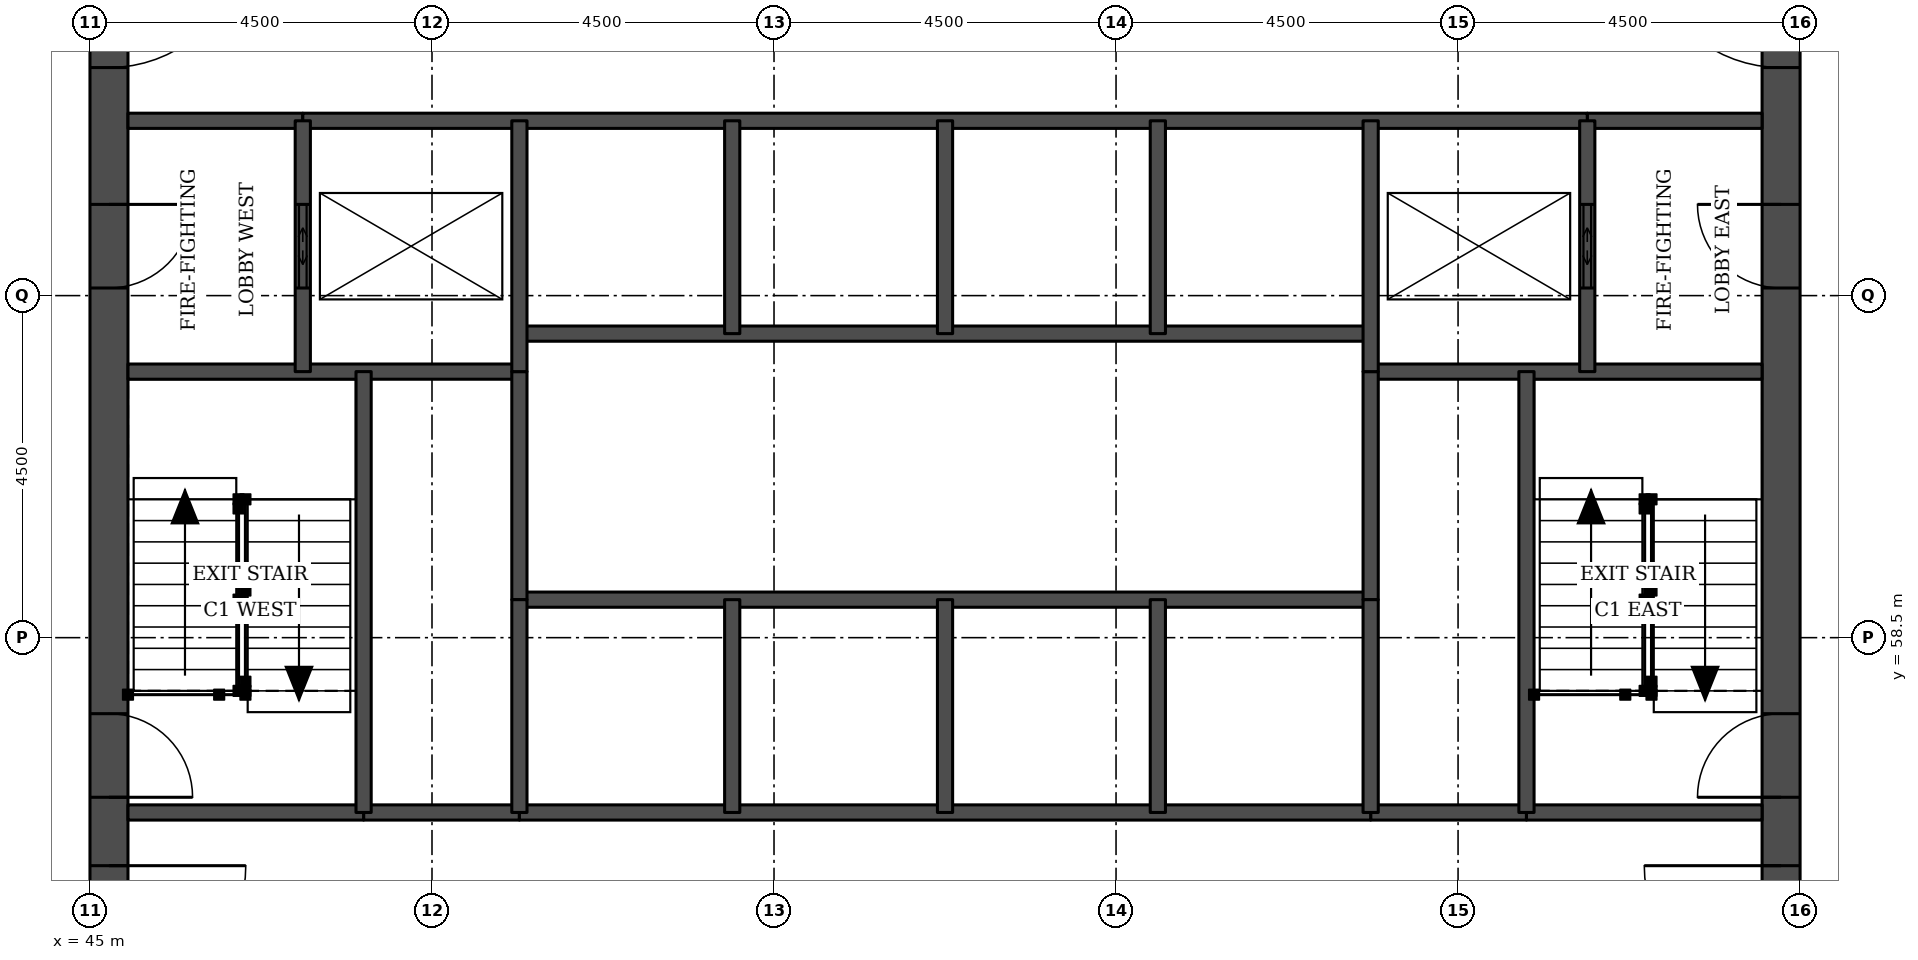
"""IFC4 building model, lengths in metres.
Left out: names, types, materials, properties, quantities, classifications, styles, units other than length and angle.
Written with IfcOpenShell. Run it as: python <this file> out.ifc"""

import sys

from ifc_helpers import new_model, si_unit, direction, frame, frame_2d, origin, place, context, subcontext, project, spatial, rectangle, extrude, element, fill, save


model = new_model("IFC4")
c1 = context("Model", 3, precision=1e-05, world=origin(), true_north=direction((0.0, 1.0)))
c2 = subcontext(c1, "Body", "Model", "MODEL_VIEW")
j1 = project(units=[si_unit("LENGTHUNIT", "METRE"), si_unit("PLANEANGLEUNIT", "RADIAN")], contexts=[c1])
p1 = place(None, origin())
s1 = spatial("IfcSite", under=j1, at=p1, CompositionType="ELEMENT")
p2 = place(p1, origin())
s2 = spatial("IfcBuilding", under=s1, at=p2, CompositionType="ELEMENT")
p3 = place(p2, frame((0.0, 0.0, 46.2)))
s3 = spatial("IfcBuildingStorey", under=s2, at=p3, CompositionType="ELEMENT", Elevation=46.2)
p4 = place(p3, frame((45.25, 49.5, 0.0), z_axis=(0.0, 0.0, 1.0), x_axis=(0.0, 1.0, 0.0)))
e1 = element("IfcWall", 1, at=p4, inside=s3, PredefinedType="SHEAR", context=c2, shape_type="SweptSolid", body=[
    extrude(rectangle(XDim=22.5, YDim=0.5, at=frame_2d((11.25, 0.0))), origin(), (0.0, 0.0, 1.0), 3.3),
])
p5 = place(p4, frame((4.2, 0.0, 0.0)))
e2 = element("IfcOpeningElement", 2, at=p5, cuts=e1, PredefinedType="OPENING", context=c2, shape_type="SweptSolid", body=[
    extrude(rectangle(XDim=1.8, YDim=2.1, at=frame_2d((0.9, 1.05))), frame((0.0, 0.26, 0.0), z_axis=(0.0, -1.0, 0.0), x_axis=(1.0, 0.0, 0.0)), (0.0, 0.0, 1.0), 0.52),
])
p6 = place(p4, frame((6.9, 0.0, 0.0)))
e3 = element("IfcOpeningElement", 3, at=p6, cuts=e1, PredefinedType="OPENING", context=c2, shape_type="SweptSolid", body=[
    extrude(rectangle(XDim=1.1, YDim=2.1, at=frame_2d((0.55, 1.05))), frame((0.0, 0.26, 0.0), z_axis=(0.0, -1.0, 0.0), x_axis=(1.0, 0.0, 0.0)), (0.0, 0.0, 1.0), 0.52),
])
p7 = place(p4, frame((13.6, 0.0, 0.0)))
e4 = element("IfcOpeningElement", 4, at=p7, cuts=e1, PredefinedType="OPENING", context=c2, shape_type="SweptSolid", body=[
    extrude(rectangle(XDim=1.1, YDim=2.1, at=frame_2d((0.55, 1.05))), frame((0.0, 0.26, 0.0), z_axis=(0.0, -1.0, 0.0), x_axis=(1.0, 0.0, 0.0)), (0.0, 0.0, 1.0), 0.52),
])
p8 = place(p4, frame((16.5, 0.0, 0.0)))
e5 = element("IfcOpeningElement", 5, at=p8, cuts=e1, PredefinedType="OPENING", context=c2, shape_type="SweptSolid", body=[
    extrude(rectangle(XDim=1.8, YDim=2.1, at=frame_2d((0.9, 1.05))), frame((0.0, 0.26, 0.0), z_axis=(0.0, -1.0, 0.0), x_axis=(1.0, 0.0, 0.0)), (0.0, 0.0, 1.0), 0.52),
])
p9 = place(p3, frame((67.25, 49.5, 0.0), z_axis=(0.0, 0.0, 1.0), x_axis=(0.0, 1.0, 0.0)))
e6 = element("IfcWall", 6, at=p9, inside=s3, PredefinedType="SHEAR", context=c2, shape_type="SweptSolid", body=[
    extrude(rectangle(XDim=22.5, YDim=0.5, at=frame_2d((11.25, 0.0))), origin(), (0.0, 0.0, 1.0), 3.3),
])
p10 = place(p9, frame((4.2, 0.0, 0.0)))
e7 = element("IfcOpeningElement", 7, at=p10, cuts=e6, PredefinedType="OPENING", context=c2, shape_type="SweptSolid", body=[
    extrude(rectangle(XDim=1.8, YDim=2.1, at=frame_2d((0.9, 1.05))), frame((0.0, 0.26, 0.0), z_axis=(0.0, -1.0, 0.0), x_axis=(1.0, 0.0, 0.0)), (0.0, 0.0, 1.0), 0.52),
])
p11 = place(p9, frame((6.9, 0.0, 0.0)))
e8 = element("IfcOpeningElement", 8, at=p11, cuts=e6, PredefinedType="OPENING", context=c2, shape_type="SweptSolid", body=[
    extrude(rectangle(XDim=1.1, YDim=2.1, at=frame_2d((0.55, 1.05))), frame((0.0, 0.26, 0.0), z_axis=(0.0, -1.0, 0.0), x_axis=(1.0, 0.0, 0.0)), (0.0, 0.0, 1.0), 0.52),
])
p12 = place(p9, frame((13.6, 0.0, 0.0)))
e9 = element("IfcOpeningElement", 9, at=p12, cuts=e6, PredefinedType="OPENING", context=c2, shape_type="SweptSolid", body=[
    extrude(rectangle(XDim=1.1, YDim=2.1, at=frame_2d((0.55, 1.05))), frame((0.0, 0.26, 0.0), z_axis=(0.0, -1.0, 0.0), x_axis=(1.0, 0.0, 0.0)), (0.0, 0.0, 1.0), 0.52),
])
p13 = place(p9, frame((16.5, 0.0, 0.0)))
e10 = element("IfcOpeningElement", 10, at=p13, cuts=e6, PredefinedType="OPENING", context=c2, shape_type="SweptSolid", body=[
    extrude(rectangle(XDim=1.8, YDim=2.1, at=frame_2d((0.9, 1.05))), frame((0.0, 0.26, 0.0), z_axis=(0.0, -1.0, 0.0), x_axis=(1.0, 0.0, 0.0)), (0.0, 0.0, 1.0), 0.52),
])
for number, where, z_axis, x_axis in (
    (11, (48.6, 56.2, 0.0), (0.0, 0.0, 1.0), (1.0, 0.0, 0.0)),
    (12, (61.85, 56.2, 0.0), (0.0, 0.0, 1.0), (1.0, 0.0, 0.0)),
):
    element("IfcWall", number, at=place(p3, frame(where, z_axis=z_axis, x_axis=x_axis)), inside=s3, PredefinedType="SOLIDWALL", context=c2, shape_type="SweptSolid", body=[
        extrude(rectangle(XDim=2.05, YDim=0.2, at=frame_2d((1.025, 0.0))), origin(), (0.0, 0.0, 1.0), 3.08),
    ])
p14 = place(p3, frame((45.5, 56.2, 0.0), z_axis=(0.0, 0.0, 1.0), x_axis=(1.0, 0.0, 0.0)))
e13 = element("IfcWall", 13, at=p14, inside=s3, PredefinedType="SOLIDWALL", context=c2, shape_type="SweptSolid", body=[
    extrude(rectangle(XDim=3.1, YDim=0.2, at=frame_2d((1.55, 0.0))), origin(), (0.0, 0.0, 1.0), 3.08),
])
p15 = place(p3, frame((50.65, 56.2, 0.0), z_axis=(0.0, 0.0, 1.0), x_axis=(1.0, 0.0, 0.0)))
e14 = element("IfcWall", 14, at=p15, inside=s3, PredefinedType="SOLIDWALL", context=c2, shape_type="SweptSolid", body=[
    extrude(rectangle(XDim=11.2, YDim=0.2, at=frame_2d((5.6, 0.0))), origin(), (0.0, 0.0, 1.0), 3.08),
])
p16 = place(p3, frame((63.9, 56.2, 0.0), z_axis=(0.0, 0.0, 1.0), x_axis=(1.0, 0.0, 0.0)))
e15 = element("IfcWall", 15, at=p16, inside=s3, PredefinedType="SOLIDWALL", context=c2, shape_type="SweptSolid", body=[
    extrude(rectangle(XDim=3.1, YDim=0.2, at=frame_2d((1.55, 0.0))), origin(), (0.0, 0.0, 1.0), 3.08),
])
p17 = place(p3, frame((50.65, 59.0, 0.0), z_axis=(0.0, 0.0, 1.0), x_axis=(1.0, 0.0, 0.0)))
e16 = element("IfcWall", 16, at=p17, inside=s3, PredefinedType="SOLIDWALL", context=c2, shape_type="SweptSolid", body=[
    extrude(rectangle(XDim=11.2, YDim=0.2, at=frame_2d((5.6, 0.0))), origin(), (0.0, 0.0, 1.0), 3.3),
])
for number, where, z_axis, x_axis in (
    (17, (45.5, 62.0, 0.0), (0.0, 0.0, 1.0), (1.0, 0.0, 0.0)),
    (18, (61.85, 62.0, 0.0), (0.0, 0.0, 1.0), (1.0, 0.0, 0.0)),
):
    element("IfcWall", number, at=place(p3, frame(where, z_axis=z_axis, x_axis=x_axis)), inside=s3, PredefinedType="SOLIDWALL", context=c2, shape_type="SweptSolid", body=[
        extrude(rectangle(XDim=5.15, YDim=0.2, at=frame_2d((2.575, 0.0))), origin(), (0.0, 0.0, 1.0), 3.08),
    ])
p18 = place(p3, frame((50.65, 62.5, 0.0), z_axis=(0.0, 0.0, 1.0), x_axis=(1.0, 0.0, 0.0)))
e19 = element("IfcWall", 19, at=p18, inside=s3, PredefinedType="SOLIDWALL", context=c2, shape_type="SweptSolid", body=[
    extrude(rectangle(XDim=11.2, YDim=0.2, at=frame_2d((5.6, 0.0))), origin(), (0.0, 0.0, 1.0), 3.3),
])
for number, where, z_axis, x_axis in (
    (20, (45.5, 65.3, 0.0), (0.0, 0.0, 1.0), (1.0, 0.0, 0.0)),
    (21, (64.7, 65.3, 0.0), (0.0, 0.0, 1.0), (1.0, 0.0, 0.0)),
):
    element("IfcWall", number, at=place(p3, frame(where, z_axis=z_axis, x_axis=x_axis)), inside=s3, PredefinedType="SOLIDWALL", context=c2, shape_type="SweptSolid", body=[
        extrude(rectangle(XDim=2.3, YDim=0.2, at=frame_2d((1.15, 0.0))), origin(), (0.0, 0.0, 1.0), 3.08),
    ])
p19 = place(p3, frame((47.8, 65.3, 0.0), z_axis=(0.0, 0.0, 1.0), x_axis=(1.0, 0.0, 0.0)))
e22 = element("IfcWall", 22, at=p19, inside=s3, PredefinedType="SOLIDWALL", context=c2, shape_type="SweptSolid", body=[
    extrude(rectangle(XDim=16.9, YDim=0.2, at=frame_2d((8.45, 0.0))), origin(), (0.0, 0.0, 1.0), 3.08),
])
p20 = place(p3, frame((47.8, 62.0, 0.0), z_axis=(0.0, 0.0, 1.0), x_axis=(0.0, 1.0, 0.0)))
e23 = element("IfcWall", 23, at=p20, inside=s3, PredefinedType="SOLIDWALL", context=c2, shape_type="SweptSolid", body=[
    extrude(rectangle(XDim=3.3, YDim=0.2, at=frame_2d((1.65, 0.0))), origin(), (0.0, 0.0, 1.0), 3.08),
])
p21 = place(p20, frame((1.1, 0.0, 0.0)))
e24 = element("IfcOpeningElement", 24, at=p21, cuts=e23, PredefinedType="OPENING", context=c2, shape_type="SweptSolid", body=[
    extrude(rectangle(XDim=1.1, YDim=2.1, at=frame_2d((0.55, 1.05))), frame((0.0, 0.11, 0.0), z_axis=(0.0, -1.0, 0.0), x_axis=(1.0, 0.0, 0.0)), (0.0, 0.0, 1.0), 0.22),
])
p22 = place(p3, frame((48.6, 56.2, 0.0), z_axis=(0.0, 0.0, 1.0), x_axis=(0.0, 1.0, 0.0)))
e25 = element("IfcWall", 25, at=p22, inside=s3, PredefinedType="SOLIDWALL", context=c2, shape_type="SweptSolid", body=[
    extrude(rectangle(XDim=5.8, YDim=0.2, at=frame_2d((2.9, 0.0))), origin(), (0.0, 0.0, 1.0), 3.08),
])
p23 = place(p3, frame((50.65, 59.0, 0.0), z_axis=(0.0, 0.0, 1.0), x_axis=(0.0, 1.0, 0.0)))
e26 = element("IfcWall", 26, at=p23, inside=s3, PredefinedType="SOLIDWALL", context=c2, shape_type="SweptSolid", body=[
    extrude(rectangle(XDim=3.0, YDim=0.2, at=frame_2d((1.5, 0.0))), origin(), (0.0, 0.0, 1.0), 3.3),
])
p24 = place(p3, frame((50.65, 56.2, 0.0), z_axis=(0.0, 0.0, 1.0), x_axis=(0.0, 1.0, 0.0)))
e27 = element("IfcWall", 27, at=p24, inside=s3, PredefinedType="SOLIDWALL", context=c2, shape_type="SweptSolid", body=[
    extrude(rectangle(XDim=2.8, YDim=0.2, at=frame_2d((1.4, 0.0))), origin(), (0.0, 0.0, 1.0), 3.08),
])
p25 = place(p3, frame((50.65, 62.0, 0.0), z_axis=(0.0, 0.0, 1.0), x_axis=(0.0, 1.0, 0.0)))
e28 = element("IfcWall", 28, at=p25, inside=s3, PredefinedType="SOLIDWALL", context=c2, shape_type="SweptSolid", body=[
    extrude(rectangle(XDim=3.3, YDim=0.2, at=frame_2d((1.65, 0.0))), origin(), (0.0, 0.0, 1.0), 3.08),
])
for number, where, z_axis, x_axis in (
    (29, (53.45, 56.2, 0.0), (0.0, 0.0, 1.0), (0.0, 1.0, 0.0)),
    (30, (53.45, 62.5, 0.0), (0.0, 0.0, 1.0), (0.0, 1.0, 0.0)),
    (31, (56.25, 56.2, 0.0), (0.0, 0.0, 1.0), (0.0, 1.0, 0.0)),
    (32, (56.25, 62.5, 0.0), (0.0, 0.0, 1.0), (0.0, 1.0, 0.0)),
    (33, (59.05, 56.2, 0.0), (0.0, 0.0, 1.0), (0.0, 1.0, 0.0)),
    (34, (59.05, 62.5, 0.0), (0.0, 0.0, 1.0), (0.0, 1.0, 0.0)),
):
    element("IfcWall", number, at=place(p3, frame(where, z_axis=z_axis, x_axis=x_axis)), inside=s3, PredefinedType="SOLIDWALL", context=c2, shape_type="SweptSolid", body=[
        extrude(rectangle(XDim=2.8, YDim=0.2, at=frame_2d((1.4, 0.0))), origin(), (0.0, 0.0, 1.0), 3.08),
    ])
p26 = place(p3, frame((61.85, 59.0, 0.0), z_axis=(0.0, 0.0, 1.0), x_axis=(0.0, 1.0, 0.0)))
e35 = element("IfcWall", 35, at=p26, inside=s3, PredefinedType="SOLIDWALL", context=c2, shape_type="SweptSolid", body=[
    extrude(rectangle(XDim=3.0, YDim=0.2, at=frame_2d((1.5, 0.0))), origin(), (0.0, 0.0, 1.0), 3.3),
])
p27 = place(p3, frame((61.85, 56.2, 0.0), z_axis=(0.0, 0.0, 1.0), x_axis=(0.0, 1.0, 0.0)))
e36 = element("IfcWall", 36, at=p27, inside=s3, PredefinedType="SOLIDWALL", context=c2, shape_type="SweptSolid", body=[
    extrude(rectangle(XDim=2.8, YDim=0.2, at=frame_2d((1.4, 0.0))), origin(), (0.0, 0.0, 1.0), 3.08),
])
p28 = place(p3, frame((61.85, 62.0, 0.0), z_axis=(0.0, 0.0, 1.0), x_axis=(0.0, 1.0, 0.0)))
e37 = element("IfcWall", 37, at=p28, inside=s3, PredefinedType="SOLIDWALL", context=c2, shape_type="SweptSolid", body=[
    extrude(rectangle(XDim=3.3, YDim=0.2, at=frame_2d((1.65, 0.0))), origin(), (0.0, 0.0, 1.0), 3.08),
])
p29 = place(p3, frame((63.9, 56.2, 0.0), z_axis=(0.0, 0.0, 1.0), x_axis=(0.0, 1.0, 0.0)))
e38 = element("IfcWall", 38, at=p29, inside=s3, PredefinedType="SOLIDWALL", context=c2, shape_type="SweptSolid", body=[
    extrude(rectangle(XDim=5.8, YDim=0.2, at=frame_2d((2.9, 0.0))), origin(), (0.0, 0.0, 1.0), 3.08),
])
p30 = place(p3, frame((64.7, 62.0, 0.0), z_axis=(0.0, 0.0, 1.0), x_axis=(0.0, 1.0, 0.0)))
e39 = element("IfcWall", 39, at=p30, inside=s3, PredefinedType="SOLIDWALL", context=c2, shape_type="SweptSolid", body=[
    extrude(rectangle(XDim=3.3, YDim=0.2, at=frame_2d((1.65, 0.0))), origin(), (0.0, 0.0, 1.0), 3.08),
])
p31 = place(p30, frame((1.1, 0.0, 0.0)))
e40 = element("IfcOpeningElement", 40, at=p31, cuts=e39, PredefinedType="OPENING", context=c2, shape_type="SweptSolid", body=[
    extrude(rectangle(XDim=1.1, YDim=2.1, at=frame_2d((0.55, 1.05))), frame((0.0, 0.11, 0.0), z_axis=(0.0, -1.0, 0.0), x_axis=(1.0, 0.0, 0.0)), (0.0, 0.0, 1.0), 0.22),
])
p32 = place(p21, origin())
e41 = element("IfcDoor", 41, at=p32, inside=s3, OperationType="DOUBLE_DOOR_SLIDING", PredefinedType="DOOR", context=c2, shape_type="SweptSolid", body=[
    extrude(rectangle(XDim=1.1, YDim=2.1, at=frame_2d((0.55, 1.05))), frame((0.0, 0.025, 0.0), z_axis=(0.0, -1.0, 0.0), x_axis=(1.0, 0.0, 0.0)), (0.0, 0.0, 1.0), 0.05),
])
fill(e24, e41)
p33 = place(p31, origin())
e42 = element("IfcDoor", 42, at=p33, inside=s3, OperationType="DOUBLE_DOOR_SLIDING", PredefinedType="DOOR", context=c2, shape_type="SweptSolid", body=[
    extrude(rectangle(XDim=1.1, YDim=2.1, at=frame_2d((0.55, 1.05))), frame((0.0, 0.025, 0.0), z_axis=(0.0, -1.0, 0.0), x_axis=(1.0, 0.0, 0.0)), (0.0, 0.0, 1.0), 0.05),
])
fill(e40, e42)
p34 = place(p5, frame((1.8, 0.0, 0.0), z_axis=(0.0, 0.0, 1.0), x_axis=(-1.0, 0.0, 0.0)))
e43 = element("IfcDoor", 43, at=p34, inside=s3, OperationType="SINGLE_SWING_LEFT", PredefinedType="DOOR", context=c2, shape_type="SweptSolid", body=[
    extrude(rectangle(XDim=1.8, YDim=2.1, at=frame_2d((0.9, 1.05))), frame((0.0, 0.025, 0.0), z_axis=(0.0, -1.0, 0.0), x_axis=(1.0, 0.0, 0.0)), (0.0, 0.0, 1.0), 0.05),
])
fill(e2, e43)
p35 = place(p6, frame((1.1, 0.0, 0.0), z_axis=(0.0, 0.0, 1.0), x_axis=(-1.0, 0.0, 0.0)))
e44 = element("IfcDoor", 44, at=p35, inside=s3, OperationType="SINGLE_SWING_RIGHT", PredefinedType="DOOR", context=c2, shape_type="SweptSolid", body=[
    extrude(rectangle(XDim=1.1, YDim=2.1, at=frame_2d((0.55, 1.05))), frame((0.0, 0.025, 0.0), z_axis=(0.0, -1.0, 0.0), x_axis=(1.0, 0.0, 0.0)), (0.0, 0.0, 1.0), 0.05),
])
fill(e3, e44)
p36 = place(p7, frame((1.1, 0.0, 0.0), z_axis=(0.0, 0.0, 1.0), x_axis=(-1.0, 0.0, 0.0)))
e45 = element("IfcDoor", 45, at=p36, inside=s3, OperationType="SINGLE_SWING_LEFT", PredefinedType="DOOR", context=c2, shape_type="SweptSolid", body=[
    extrude(rectangle(XDim=1.1, YDim=2.1, at=frame_2d((0.55, 1.05))), frame((0.0, 0.025, 0.0), z_axis=(0.0, -1.0, 0.0), x_axis=(1.0, 0.0, 0.0)), (0.0, 0.0, 1.0), 0.05),
])
fill(e4, e45)
p37 = place(p8, frame((1.8, 0.0, 0.0), z_axis=(0.0, 0.0, 1.0), x_axis=(-1.0, 0.0, 0.0)))
e46 = element("IfcDoor", 46, at=p37, inside=s3, OperationType="SINGLE_SWING_LEFT", PredefinedType="DOOR", context=c2, shape_type="SweptSolid", body=[
    extrude(rectangle(XDim=1.8, YDim=2.1, at=frame_2d((0.9, 1.05))), frame((0.0, 0.025, 0.0), z_axis=(0.0, -1.0, 0.0), x_axis=(1.0, 0.0, 0.0)), (0.0, 0.0, 1.0), 0.05),
])
fill(e5, e46)
p38 = place(p10, origin())
e47 = element("IfcDoor", 47, at=p38, inside=s3, OperationType="SINGLE_SWING_RIGHT", PredefinedType="DOOR", context=c2, shape_type="SweptSolid", body=[
    extrude(rectangle(XDim=1.8, YDim=2.1, at=frame_2d((0.9, 1.05))), frame((0.0, 0.025, 0.0), z_axis=(0.0, -1.0, 0.0), x_axis=(1.0, 0.0, 0.0)), (0.0, 0.0, 1.0), 0.05),
])
fill(e7, e47)
p39 = place(p11, origin())
e48 = element("IfcDoor", 48, at=p39, inside=s3, OperationType="SINGLE_SWING_LEFT", PredefinedType="DOOR", context=c2, shape_type="SweptSolid", body=[
    extrude(rectangle(XDim=1.1, YDim=2.1, at=frame_2d((0.55, 1.05))), frame((0.0, 0.025, 0.0), z_axis=(0.0, -1.0, 0.0), x_axis=(1.0, 0.0, 0.0)), (0.0, 0.0, 1.0), 0.05),
])
fill(e8, e48)
p40 = place(p12, origin())
e49 = element("IfcDoor", 49, at=p40, inside=s3, OperationType="SINGLE_SWING_RIGHT", PredefinedType="DOOR", context=c2, shape_type="SweptSolid", body=[
    extrude(rectangle(XDim=1.1, YDim=2.1, at=frame_2d((0.55, 1.05))), frame((0.0, 0.025, 0.0), z_axis=(0.0, -1.0, 0.0), x_axis=(1.0, 0.0, 0.0)), (0.0, 0.0, 1.0), 0.05),
])
fill(e9, e49)
p41 = place(p13, origin())
e50 = element("IfcDoor", 50, at=p41, inside=s3, OperationType="SINGLE_SWING_RIGHT", PredefinedType="DOOR", context=c2, shape_type="SweptSolid", body=[
    extrude(rectangle(XDim=1.8, YDim=2.1, at=frame_2d((0.9, 1.05))), frame((0.0, 0.025, 0.0), z_axis=(0.0, -1.0, 0.0), x_axis=(1.0, 0.0, 0.0)), (0.0, 0.0, 1.0), 0.05),
])
fill(e10, e50)
save(model, sys.argv[1])
